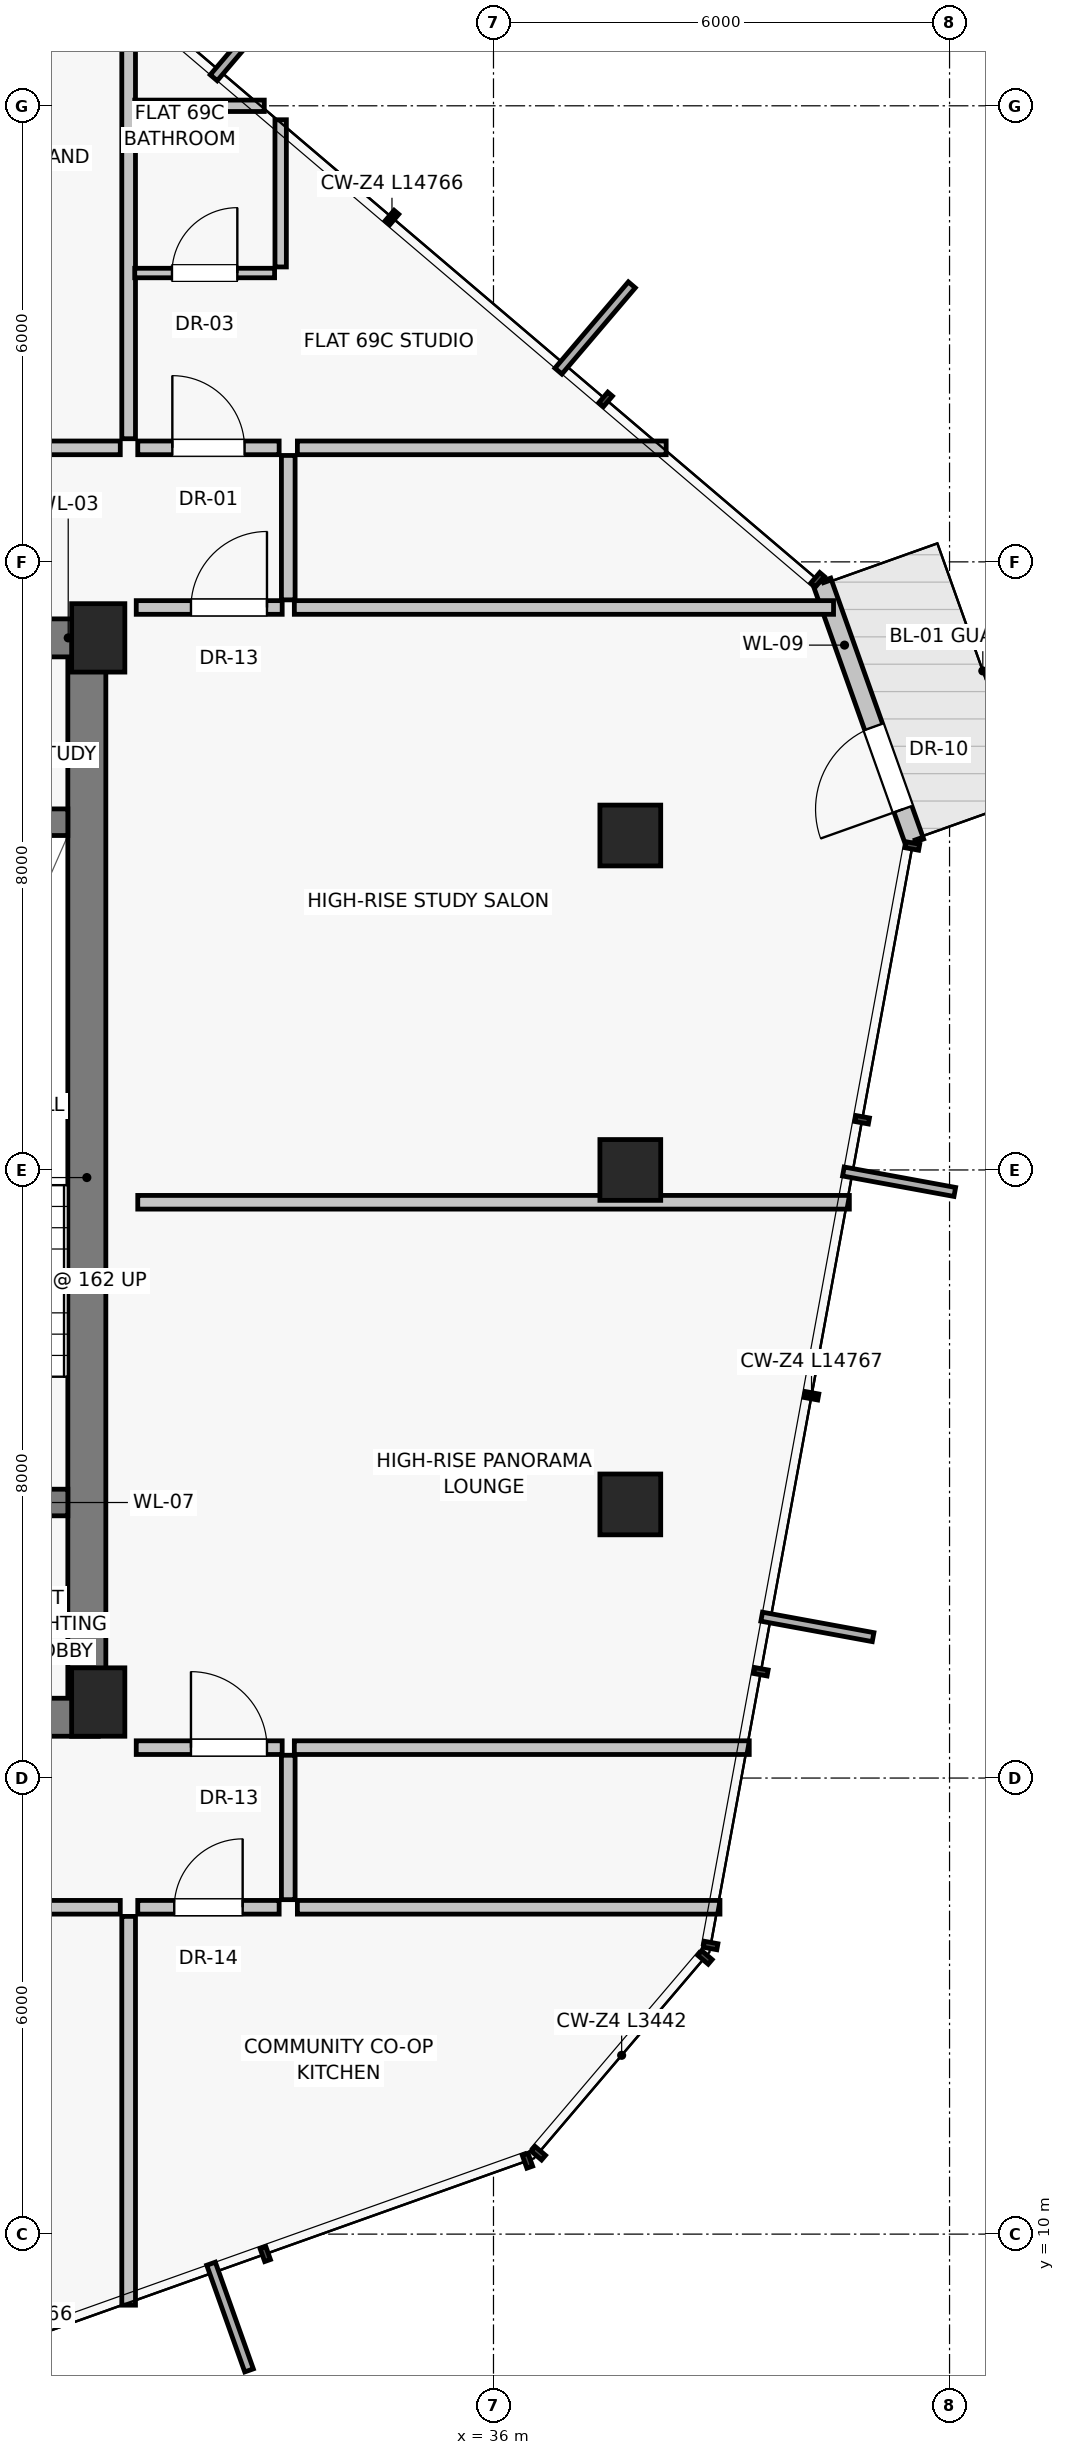
"""IFC4 building model, lengths in metres.
Left out: names, types, materials, properties, quantities, classifications, styles, units other than length and angle.
Written with IfcOpenShell. Run it as: python <this file> out.ifc"""

import sys

from ifc_helpers import new_model, si_unit, direction, frame, frame_2d, origin, origin_2d, place, context, subcontext, project, spatial, rectangle, extrude, source, transform, mapped, element, fill, save


model = new_model("IFC4")
c1 = context("Model", 3, precision=1e-05, world=origin(), true_north=direction((0.0, 1.0)))
c2 = subcontext(c1, "Body", "Model", "MODEL_VIEW")
j1 = project(units=[si_unit("LENGTHUNIT", "METRE"), si_unit("PLANEANGLEUNIT", "RADIAN")], contexts=[c1])
p1 = place(None, origin())
s1 = spatial("IfcSite", under=j1, at=p1, CompositionType="ELEMENT")
p2 = place(p1, origin())
s2 = spatial("IfcBuilding", under=s1, at=p2, CompositionType="ELEMENT")
p3 = place(p2, frame((0.0, 0.0, 244.75)))
s3 = spatial("IfcBuildingStorey", under=s2, at=p3, CompositionType="ELEMENT", Elevation=244.75)
for number, where, z_axis, x_axis in (
    (1, (30.8, 17.0, 0.0), (0.0, 0.0, 1.0), (1.0, 0.0, 0.0)),
    (2, (30.8, 31.0, 0.0), (0.0, 0.0, 1.0), (1.0, 0.0, 0.0)),
):
    element("IfcColumn", number, at=place(p3, frame(where, z_axis=z_axis, x_axis=x_axis)), inside=s3, PredefinedType="PILASTER", context=c2, shape_type="SweptSolid", body=[
        extrude(rectangle(XDim=0.7, YDim=0.9, at=origin_2d()), origin(), (0.0, 0.0, 1.0), 3.25),
    ])
for number, where, z_axis, x_axis in (
    (3, (37.8, 19.6, 0.0), (0.0, 0.0, 1.0), (1.0, 0.0, 0.0)),
    (4, (37.8, 24.0, 0.0), (0.0, 0.0, 1.0), (1.0, 0.0, 0.0)),
    (5, (37.8, 28.4, 0.0), (0.0, 0.0, 1.0), (1.0, 0.0, 0.0)),
):
    element("IfcColumn", number, at=place(p3, frame(where, z_axis=z_axis, x_axis=x_axis)), inside=s3, PredefinedType="COLUMN", context=c2, shape_type="SweptSolid", body=[
        extrude(rectangle(XDim=0.8, YDim=0.8, at=origin_2d()), origin(), (0.0, 0.0, 1.0), 3.25),
    ])
p4 = place(p3, frame((41.541, 28.313, 0.0), z_axis=(0.0, 0.0, 1.0), x_axis=(-0.33546582339, 0.942052377173, 0.0)))
e6 = element("IfcWall", 6, at=p4, inside=s3, PredefinedType="SOLIDWALL", context=c2, shape_type="SweptSolid", body=[
    extrude(rectangle(XDim=3.643, YDim=0.25, at=frame_2d((1.821, 0.0))), origin(), (0.0, 0.0, 1.0), 3.015),
])
p5 = place(p4, frame((0.46, 0.0, 0.0)))
e7 = element("IfcOpeningElement", 7, at=p5, cuts=e6, PredefinedType="OPENING", context=c2, shape_type="SweptSolid", body=[
    extrude(rectangle(XDim=1.15, YDim=2.25, at=frame_2d((0.575, 1.125))), frame((0.0, 0.135, 0.0), z_axis=(0.0, -1.0, 0.0), x_axis=(1.0, 0.0, 0.0)), (0.0, 0.0, 1.0), 0.27),
])
p6 = place(p3, frame((30.65, 16.8, 0.0), z_axis=(0.0, 0.0, 1.0), x_axis=(0.0, 1.0, 0.0)))
e8 = element("IfcWall", 8, at=p6, inside=s3, PredefinedType="SHEAR", context=c2, shape_type="SweptSolid", body=[
    extrude(rectangle(XDim=14.2, YDim=0.5, at=frame_2d((7.1, 0.0))), origin(), (0.0, 0.0, 1.0), 3.015),
])
p7 = place(p3, frame((24.95, 16.8, 0.0), z_axis=(0.0, 0.0, 1.0), x_axis=(1.0, 0.0, 0.0)))
e9 = element("IfcWall", 9, at=p7, inside=s3, PredefinedType="SHEAR", context=c2, shape_type="SweptSolid", body=[
    extrude(rectangle(XDim=5.85, YDim=0.5, at=frame_2d((2.925, 0.0))), origin(), (0.0, 0.0, 1.0), 3.015),
])
p8 = place(p7, frame((2.15, 0.0, 0.0)))
e10 = element("IfcOpeningElement", 10, at=p8, cuts=e9, PredefinedType="OPENING", context=c2, shape_type="SweptSolid", body=[
    extrude(rectangle(XDim=1.2, YDim=2.03, at=frame_2d((0.6, 1.015))), frame((0.0, 0.26, 0.0), z_axis=(0.0, -1.0, 0.0), x_axis=(1.0, 0.0, 0.0)), (0.0, 0.0, 1.0), 0.52),
])
p9 = place(p3, frame((27.0, 31.0, 0.0), z_axis=(0.0, 0.0, 1.0), x_axis=(1.0, 0.0, 0.0)))
e11 = element("IfcWall", 11, at=p9, inside=s3, PredefinedType="SHEAR", context=c2, shape_type="SweptSolid", body=[
    extrude(rectangle(XDim=3.8, YDim=0.5, at=frame_2d((1.9, 0.0))), origin(), (0.0, 0.0, 1.0), 3.015),
])
p10 = place(p9, frame((0.45, 0.0, 0.0)))
e12 = element("IfcOpeningElement", 12, at=p10, cuts=e11, PredefinedType="OPENING", context=c2, shape_type="SweptSolid", body=[
    extrude(rectangle(XDim=0.86, YDim=2.01, at=frame_2d((0.43, 1.005))), frame((0.0, 0.26, 0.0), z_axis=(0.0, -1.0, 0.0), x_axis=(1.0, 0.0, 0.0)), (0.0, 0.0, 1.0), 0.52),
])
p11 = place(p9, frame((1.9, 0.0, 0.0)))
e13 = element("IfcOpeningElement", 13, at=p11, cuts=e11, PredefinedType="OPENING", context=c2, shape_type="SweptSolid", body=[
    extrude(rectangle(XDim=0.86, YDim=2.01, at=frame_2d((0.43, 1.005))), frame((0.0, 0.26, 0.0), z_axis=(0.0, -1.0, 0.0), x_axis=(1.0, 0.0, 0.0)), (0.0, 0.0, 1.0), 0.52),
])
p12 = place(p3, frame((27.025, 19.625, 0.0), z_axis=(0.0, 0.0, 1.0), x_axis=(1.0, 0.0, 0.0)))
e14 = element("IfcWall", 14, at=p12, inside=s3, PredefinedType="SHEAR", context=c2, shape_type="SweptSolid", body=[
    extrude(rectangle(XDim=3.375, YDim=0.35, at=frame_2d((1.688, 0.0))), origin(), (0.0, 0.0, 1.0), 3.015),
])
p13 = place(p12, frame((1.05, 0.0, 0.0)))
e15 = element("IfcOpeningElement", 15, at=p13, cuts=e14, PredefinedType="OPENING", context=c2, shape_type="SweptSolid", body=[
    extrude(rectangle(XDim=1.1, YDim=2.03, at=frame_2d((0.55, 1.015))), frame((0.0, 0.185, 0.0), z_axis=(0.0, -1.0, 0.0), x_axis=(1.0, 0.0, 0.0)), (0.0, 0.0, 1.0), 0.37),
])
p14 = place(p3, frame((27.025, 28.575, 0.0), z_axis=(0.0, 0.0, 1.0), x_axis=(1.0, 0.0, 0.0)))
e16 = element("IfcWall", 16, at=p14, inside=s3, PredefinedType="SHEAR", context=c2, shape_type="SweptSolid", body=[
    extrude(rectangle(XDim=3.375, YDim=0.35, at=frame_2d((1.688, 0.0))), origin(), (0.0, 0.0, 1.0), 3.015),
])
p15 = place(p3, frame((31.2, 14.18, 0.0), z_axis=(0.0, 0.0, 1.0), x_axis=(0.0, -1.0, 0.0)))
e17 = element("IfcWall", 17, at=p15, inside=s3, PredefinedType="PARTITIONING", context=c2, shape_type="SweptSolid", body=[
    extrude(rectangle(XDim=5.115, YDim=0.18, at=frame_2d((2.557, 0.0))), origin(), (0.0, 0.0, 1.0), 3.015),
])
p16 = place(p3, frame((23.58, 14.3, 0.0), z_axis=(0.0, 0.0, 1.0), x_axis=(1.0, 0.0, 0.0)))
e18 = element("IfcWall", 18, at=p16, inside=s3, PredefinedType="PARTITIONING", context=c2, shape_type="SweptSolid", body=[
    extrude(rectangle(XDim=7.51, YDim=0.18, at=frame_2d((3.755, 0.0))), origin(), (0.0, 0.0, 1.0), 3.015),
])
p17 = place(p16, frame((3.255, 0.0, 0.0)))
e19 = element("IfcOpeningElement", 19, at=p17, cuts=e18, PredefinedType="OPENING", context=c2, shape_type="SweptSolid", body=[
    extrude(rectangle(XDim=1.0, YDim=2.01, at=frame_2d((0.5, 1.005))), frame((0.0, 0.1, 0.0), z_axis=(0.0, -1.0, 0.0), x_axis=(1.0, 0.0, 0.0)), (0.0, 0.0, 1.0), 0.2),
])
p18 = place(p3, frame((31.2, 33.62, 0.0), z_axis=(0.0, 0.0, 1.0), x_axis=(0.0, 1.0, 0.0)))
e20 = element("IfcWall", 20, at=p18, inside=s3, PredefinedType="PARTITIONING", context=c2, shape_type="SweptSolid", body=[
    extrude(rectangle(XDim=5.898, YDim=0.18, at=frame_2d((2.949, 0.0))), origin(), (0.0, 0.0, 1.0), 3.015),
])
p19 = place(p3, frame((27.33, 33.5, 0.0), z_axis=(0.0, 0.0, 1.0), x_axis=(1.0, 0.0, 0.0)))
e21 = element("IfcWall", 21, at=p19, inside=s3, PredefinedType="PARTITIONING", context=c2, shape_type="SweptSolid", body=[
    extrude(rectangle(XDim=3.76, YDim=0.18, at=frame_2d((1.88, 0.0))), origin(), (0.0, 0.0, 1.0), 3.015),
])
p20 = place(p19, frame((1.38, 0.0, 0.0)))
e22 = element("IfcOpeningElement", 22, at=p20, cuts=e21, PredefinedType="OPENING", context=c2, shape_type="SweptSolid", body=[
    extrude(rectangle(XDim=1.0, YDim=2.01, at=frame_2d((0.5, 1.005))), frame((0.0, 0.1, 0.0), z_axis=(0.0, -1.0, 0.0), x_axis=(1.0, 0.0, 0.0)), (0.0, 0.0, 1.0), 0.2),
])
p21 = place(p3, frame((31.32, 23.575, 0.0), z_axis=(0.0, 0.0, 1.0), x_axis=(1.0, 0.0, 0.0)))
e23 = element("IfcWall", 23, at=p21, inside=s3, PredefinedType="PARTITIONING", context=c2, shape_type="SweptSolid", body=[
    extrude(rectangle(XDim=9.362, YDim=0.18, at=frame_2d((4.681, 0.0))), origin(), (0.0, 0.0, 1.0), 3.015),
])
p22 = place(p3, frame((33.3, 14.4, 0.0), z_axis=(0.0, 0.0, 1.0), x_axis=(0.0, 1.0, 0.0)))
e24 = element("IfcWall", 24, at=p22, inside=s3, PredefinedType="PARTITIONING", context=c2, shape_type="SweptSolid", body=[
    extrude(rectangle(XDim=1.9, YDim=0.18, at=frame_2d((0.95, 0.0))), origin(), (0.0, 0.0, 1.0), 3.015),
])
p23 = place(p3, frame((33.3, 31.5, 0.0), z_axis=(0.0, 0.0, 1.0), x_axis=(0.0, 1.0, 0.0)))
e25 = element("IfcWall", 25, at=p23, inside=s3, PredefinedType="PARTITIONING", context=c2, shape_type="SweptSolid", body=[
    extrude(rectangle(XDim=1.9, YDim=0.18, at=frame_2d((0.95, 0.0))), origin(), (0.0, 0.0, 1.0), 3.015),
])
p24 = place(p3, frame((31.3, 16.4, 0.0), z_axis=(0.0, 0.0, 1.0), x_axis=(1.0, 0.0, 0.0)))
e26 = element("IfcWall", 26, at=p24, inside=s3, PredefinedType="PARTITIONING", context=c2, shape_type="SweptSolid", body=[
    extrude(rectangle(XDim=1.92, YDim=0.18, at=frame_2d((0.96, 0.0))), origin(), (0.0, 0.0, 1.0), 3.015),
])
p25 = place(p24, frame((0.72, 0.0, 0.0)))
e27 = element("IfcOpeningElement", 27, at=p25, cuts=e26, PredefinedType="OPENING", context=c2, shape_type="SweptSolid", body=[
    extrude(rectangle(XDim=1.0, YDim=2.01, at=frame_2d((0.5, 1.005))), frame((0.0, 0.1, 0.0), z_axis=(0.0, -1.0, 0.0), x_axis=(1.0, 0.0, 0.0)), (0.0, 0.0, 1.0), 0.2),
])
p26 = place(p3, frame((33.38, 16.4, 0.0), z_axis=(0.0, 0.0, 1.0), x_axis=(1.0, 0.0, 0.0)))
e28 = element("IfcWall", 28, at=p26, inside=s3, PredefinedType="PARTITIONING", context=c2, shape_type="SweptSolid", body=[
    extrude(rectangle(XDim=5.985, YDim=0.18, at=frame_2d((2.993, 0.0))), origin(), (0.0, 0.0, 1.0), 3.015),
])
p27 = place(p3, frame((31.3, 31.4, 0.0), z_axis=(0.0, 0.0, 1.0), x_axis=(1.0, 0.0, 0.0)))
e29 = element("IfcWall", 29, at=p27, inside=s3, PredefinedType="PARTITIONING", context=c2, shape_type="SweptSolid", body=[
    extrude(rectangle(XDim=1.92, YDim=0.18, at=frame_2d((0.96, 0.0))), origin(), (0.0, 0.0, 1.0), 3.015),
])
p28 = place(p27, frame((0.72, 0.0, 0.0)))
e30 = element("IfcOpeningElement", 30, at=p28, cuts=e29, PredefinedType="OPENING", context=c2, shape_type="SweptSolid", body=[
    extrude(rectangle(XDim=1.0, YDim=2.01, at=frame_2d((0.5, 1.005))), frame((0.0, 0.1, 0.0), z_axis=(0.0, -1.0, 0.0), x_axis=(1.0, 0.0, 0.0)), (0.0, 0.0, 1.0), 0.2),
])
p29 = place(p3, frame((33.38, 31.4, 0.0), z_axis=(0.0, 0.0, 1.0), x_axis=(1.0, 0.0, 0.0)))
e31 = element("IfcWall", 31, at=p29, inside=s3, PredefinedType="PARTITIONING", context=c2, shape_type="SweptSolid", body=[
    extrude(rectangle(XDim=7.094, YDim=0.18, at=frame_2d((3.547, 0.0))), origin(), (0.0, 0.0, 1.0), 3.015),
])
p30 = place(p3, frame((33.42, 14.3, 0.0), z_axis=(0.0, 0.0, 1.0), x_axis=(1.0, 0.0, 0.0)))
e32 = element("IfcWall", 32, at=p30, inside=s3, PredefinedType="PARTITIONING", context=c2, shape_type="SweptSolid", body=[
    extrude(rectangle(XDim=5.56, YDim=0.18, at=frame_2d((2.78, 0.0))), origin(), (0.0, 0.0, 1.0), 3.015),
])
p31 = place(p3, frame((31.32, 14.3, 0.0), z_axis=(0.0, 0.0, 1.0), x_axis=(1.0, 0.0, 0.0)))
e33 = element("IfcWall", 33, at=p31, inside=s3, PredefinedType="PARTITIONING", context=c2, shape_type="SweptSolid", body=[
    extrude(rectangle(XDim=1.86, YDim=0.18, at=frame_2d((0.93, 0.0))), origin(), (0.0, 0.0, 1.0), 3.015),
])
p32 = place(p31, frame((0.48, 0.0, 0.0)))
e34 = element("IfcOpeningElement", 34, at=p32, cuts=e33, PredefinedType="OPENING", context=c2, shape_type="SweptSolid", body=[
    extrude(rectangle(XDim=0.9, YDim=2.01, at=frame_2d((0.45, 1.005))), frame((0.0, 0.1, 0.0), z_axis=(0.0, -1.0, 0.0), x_axis=(1.0, 0.0, 0.0)), (0.0, 0.0, 1.0), 0.2),
])
p33 = place(p3, frame((33.42, 33.5, 0.0), z_axis=(0.0, 0.0, 1.0), x_axis=(1.0, 0.0, 0.0)))
e35 = element("IfcWall", 35, at=p33, inside=s3, PredefinedType="PARTITIONING", context=c2, shape_type="SweptSolid", body=[
    extrude(rectangle(XDim=4.852, YDim=0.18, at=frame_2d((2.426, 0.0))), origin(), (0.0, 0.0, 1.0), 3.015),
])
p34 = place(p3, frame((31.32, 33.5, 0.0), z_axis=(0.0, 0.0, 1.0), x_axis=(1.0, 0.0, 0.0)))
e36 = element("IfcWall", 36, at=p34, inside=s3, PredefinedType="PARTITIONING", context=c2, shape_type="SweptSolid", body=[
    extrude(rectangle(XDim=1.86, YDim=0.18, at=frame_2d((0.93, 0.0))), origin(), (0.0, 0.0, 1.0), 3.015),
])
p35 = place(p34, frame((0.455, 0.0, 0.0)))
e37 = element("IfcOpeningElement", 37, at=p35, cuts=e36, PredefinedType="OPENING", context=c2, shape_type="SweptSolid", body=[
    extrude(rectangle(XDim=0.95, YDim=2.02, at=frame_2d((0.475, 1.01))), frame((0.0, 0.1, 0.0), z_axis=(0.0, -1.0, 0.0), x_axis=(1.0, 0.0, 0.0)), (0.0, 0.0, 1.0), 0.2),
])
p36 = place(p3, frame((31.28, 35.8, 0.0), z_axis=(0.0, 0.0, 1.0), x_axis=(1.0, 0.0, 0.0)))
e38 = element("IfcWall", 38, at=p36, inside=s3, PredefinedType="PARTITIONING", context=c2, shape_type="SweptSolid", body=[
    extrude(rectangle(XDim=1.84, YDim=0.125, at=frame_2d((0.92, 0.0))), origin(), (0.0, 0.0, 1.0), 3.015),
])
p37 = place(p36, frame((0.49, 0.0, 0.0)))
e39 = element("IfcOpeningElement", 39, at=p37, cuts=e38, PredefinedType="OPENING", context=c2, shape_type="SweptSolid", body=[
    extrude(rectangle(XDim=0.86, YDim=2.01, at=frame_2d((0.43, 1.005))), frame((0.0, 0.073, 0.0), z_axis=(0.0, -1.0, 0.0), x_axis=(1.0, 0.0, 0.0)), (0.0, 0.0, 1.0), 0.145),
])
p38 = place(p3, frame((31.28, 38.0, 0.0), z_axis=(0.0, 0.0, 1.0), x_axis=(1.0, 0.0, 0.0)))
e40 = element("IfcWall", 40, at=p38, inside=s3, PredefinedType="PARTITIONING", context=c2, shape_type="SweptSolid", body=[
    extrude(rectangle(XDim=1.704, YDim=0.15, at=frame_2d((0.852, 0.0))), origin(), (0.0, 0.0, 1.0), 3.015),
])
p39 = place(p3, frame((33.2, 35.88, 0.0), z_axis=(0.0, 0.0, 1.0), x_axis=(0.0, 1.0, 0.0)))
e41 = element("IfcWall", 41, at=p39, inside=s3, PredefinedType="PARTITIONING", context=c2, shape_type="SweptSolid", body=[
    extrude(rectangle(XDim=1.937, YDim=0.15, at=frame_2d((0.968, 0.0))), origin(), (0.0, 0.0, 1.0), 3.015),
])
m1 = source(origin(), c2, "Body", "SweptSolid", [
    extrude(rectangle(XDim=1.15, YDim=2.25, at=frame_2d((0.575, 1.125))), frame((0.0, 0.025, 0.0), z_axis=(0.0, -1.0, 0.0), x_axis=(1.0, 0.0, 0.0)), (0.0, 0.0, 1.0), 0.05),
])
p40 = place(p5, frame((1.15, 0.0, 0.0), z_axis=(0.0, 0.0, 1.0), x_axis=(-1.0, 0.0, 0.0)))
e42 = element("IfcDoor", 42, at=p40, inside=s3, OperationType="SINGLE_SWING_LEFT", PredefinedType="DOOR", context=c2, shape_type="MappedRepresentation", body=[
    mapped(m1, transform((0.0, 0.0, 0.0), scale=1.0)),
])
fill(e7, e42)
m2 = source(origin(), c2, "Body", "SweptSolid", [
    extrude(rectangle(XDim=1.0, YDim=2.01, at=frame_2d((0.5, 1.005))), frame((0.0, 0.025, 0.0), z_axis=(0.0, -1.0, 0.0), x_axis=(1.0, 0.0, 0.0)), (0.0, 0.0, 1.0), 0.05),
])
p41 = place(p25, origin())
e43 = element("IfcDoor", 43, at=p41, inside=s3, OperationType="SINGLE_SWING_LEFT", PredefinedType="DOOR", context=c2, shape_type="MappedRepresentation", body=[
    mapped(m2, transform((0.0, 0.0, 0.0), scale=1.0)),
])
fill(e27, e43)
p42 = place(p28, origin())
e44 = element("IfcDoor", 44, at=p42, inside=s3, OperationType="SINGLE_SWING_RIGHT", PredefinedType="DOOR", context=c2, shape_type="MappedRepresentation", body=[
    mapped(m2, transform((0.0, 0.0, 0.0), scale=1.0)),
])
fill(e30, e44)
m3 = source(origin(), c2, "Body", "SweptSolid", [
    extrude(rectangle(XDim=0.9, YDim=2.01, at=frame_2d((0.45, 1.005))), frame((0.0, 0.025, 0.0), z_axis=(0.0, -1.0, 0.0), x_axis=(1.0, 0.0, 0.0)), (0.0, 0.0, 1.0), 0.05),
])
p43 = place(p32, origin())
e45 = element("IfcDoor", 45, at=p43, inside=s3, OperationType="SINGLE_SWING_RIGHT", PredefinedType="DOOR", context=c2, shape_type="MappedRepresentation", body=[
    mapped(m3, transform((0.0, 0.0, 0.0), scale=1.0)),
])
fill(e34, e45)
m4 = source(origin(), c2, "Body", "SweptSolid", [
    extrude(rectangle(XDim=0.95, YDim=2.02, at=frame_2d((0.475, 1.01))), frame((0.0, 0.025, 0.0), z_axis=(0.0, -1.0, 0.0), x_axis=(1.0, 0.0, 0.0)), (0.0, 0.0, 1.0), 0.05),
])
p44 = place(p35, origin())
e46 = element("IfcDoor", 46, at=p44, inside=s3, OperationType="SINGLE_SWING_LEFT", PredefinedType="DOOR", context=c2, shape_type="MappedRepresentation", body=[
    mapped(m4, transform((0.0, 0.0, 0.0), scale=1.0)),
])
fill(e37, e46)
m5 = source(origin(), c2, "Body", "SweptSolid", [
    extrude(rectangle(XDim=0.86, YDim=2.01, at=frame_2d((0.43, 1.005))), frame((0.0, 0.025, 0.0), z_axis=(0.0, -1.0, 0.0), x_axis=(1.0, 0.0, 0.0)), (0.0, 0.0, 1.0), 0.05),
])
p45 = place(p37, origin())
e47 = element("IfcDoor", 47, at=p45, inside=s3, OperationType="SINGLE_SWING_RIGHT", PredefinedType="DOOR", context=c2, shape_type="MappedRepresentation", body=[
    mapped(m5, transform((0.0, 0.0, 0.0), scale=1.0)),
])
fill(e39, e47)
save(model, sys.argv[1])
